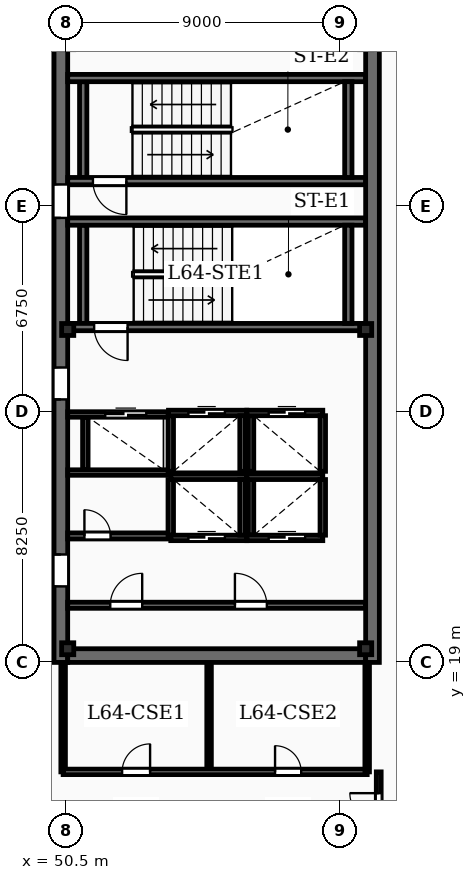
"""IFC4 building model, lengths in metres.
Left out: names, types, materials, properties, quantities, classifications, styles, units other than length and angle.
Written with IfcOpenShell. Run it as: python <this file> out.ifc"""

import sys

from ifc_helpers import new_model, si_unit, direction, frame, frame_2d, origin, origin_2d, place, context, subcontext, project, spatial, rectangle, i_section, extrude, element, fill, save


model = new_model("IFC4")
c1 = context("Model", 3, precision=1e-05, world=origin(), true_north=direction((0.0, 1.0)))
c2 = subcontext(c1, "Body", "Model", "MODEL_VIEW")
j1 = project(units=[si_unit("LENGTHUNIT", "METRE"), si_unit("PLANEANGLEUNIT", "RADIAN")], contexts=[c1])
p1 = place(None, origin())
s1 = spatial("IfcSite", under=j1, at=p1, CompositionType="ELEMENT")
p2 = place(p1, origin())
s2 = spatial("IfcBuilding", under=s1, at=p2, CompositionType="ELEMENT")
p3 = place(p2, frame((0.0, 0.0, 262.2)))
s3 = spatial("IfcBuildingStorey", under=s2, at=p3, CompositionType="ELEMENT", Elevation=262.2)
p4 = place(p3, frame((50.325, 19.0, -0.27), z_axis=(0.0, 0.0, 1.0), x_axis=(0.0, 1.0, 0.0)))
e1 = element("IfcWall", 1, at=p4, inside=s3, PredefinedType="SHEAR", context=c2, shape_type="SweptSolid", body=[
    extrude(rectangle(XDim=20.8, YDim=0.45, at=frame_2d((10.4, 0.0))), origin(), (0.0, 0.0, 1.0), 3.75),
])
p5 = place(p4, frame((2.5, 0.0, 0.27)))
e2 = element("IfcOpeningElement", 2, at=p5, cuts=e1, PredefinedType="OPENING", context=c2, shape_type="SweptSolid", body=[
    extrude(rectangle(XDim=1.05, YDim=2.15, at=frame_2d((0.525, 1.075))), frame((0.0, 0.235, 0.0), z_axis=(0.0, -1.0, 0.0), x_axis=(1.0, 0.0, 0.0)), (0.0, 0.0, 1.0), 0.47),
])
p6 = place(p4, frame((8.65, 0.0, 0.27)))
e3 = element("IfcOpeningElement", 3, at=p6, cuts=e1, PredefinedType="OPENING", context=c2, shape_type="SweptSolid", body=[
    extrude(rectangle(XDim=1.05, YDim=2.15, at=frame_2d((0.525, 1.075))), frame((0.0, 0.235, 0.0), z_axis=(0.0, -1.0, 0.0), x_axis=(1.0, 0.0, 0.0)), (0.0, 0.0, 1.0), 0.47),
])
p7 = place(p4, frame((14.62, 0.0, 0.27)))
e4 = element("IfcOpeningElement", 4, at=p7, cuts=e1, PredefinedType="OPENING", context=c2, shape_type="SweptSolid", body=[
    extrude(rectangle(XDim=1.1, YDim=2.15, at=frame_2d((0.55, 1.075))), frame((0.0, 0.235, 0.0), z_axis=(0.0, -1.0, 0.0), x_axis=(1.0, 0.0, 0.0)), (0.0, 0.0, 1.0), 0.47),
])
p8 = place(p3, frame((60.575, 19.0, -0.27), z_axis=(0.0, 0.0, 1.0), x_axis=(0.0, 1.0, 0.0)))
e5 = element("IfcWall", 5, at=p8, inside=s3, PredefinedType="SHEAR", context=c2, shape_type="SweptSolid", body=[
    extrude(rectangle(XDim=20.8, YDim=0.45, at=frame_2d((10.4, 0.0))), origin(), (0.0, 0.0, 1.0), 3.75),
])
p9 = place(p3, frame((50.55, 19.225, -0.27), z_axis=(0.0, 0.0, 1.0), x_axis=(1.0, 0.0, 0.0)))
e6 = element("IfcWall", 6, at=p9, inside=s3, PredefinedType="SHEAR", context=c2, shape_type="SweptSolid", body=[
    extrude(rectangle(XDim=9.8, YDim=0.45, at=frame_2d((4.9, 0.0))), origin(), (0.0, 0.0, 1.0), 3.75),
])
for number, where, z_axis, x_axis in (
    (7, (50.55, 19.45, -0.27), (0.0, 0.0, 1.0), (1.0, 0.0, 0.0)),
    (8, (60.35, 19.45, -0.27), (0.0, 0.0, 1.0), (1.0, 0.0, 0.0)),
    (9, (50.55, 29.95, -0.27), (0.0, 0.0, 1.0), (1.0, 0.0, 0.0)),
    (10, (60.35, 29.95, -0.27), (0.0, 0.0, 1.0), (1.0, 0.0, 0.0)),
):
    element("IfcColumn", number, at=place(p3, frame(where, z_axis=z_axis, x_axis=x_axis)), inside=s3, PredefinedType="COLUMN", context=c2, shape_type="SweptSolid", body=[
        extrude(i_section(OverallWidth=0.399, OverallDepth=0.393, WebThickness=0.023, FlangeThickness=0.037, FilletRadius=0.02, at=origin_2d()), origin(), (0.0, 0.0, 1.0), 3.75),
    ])
p10 = place(p3, frame((60.35, 30.03, 0.0), z_axis=(0.0, 0.0, 1.0), x_axis=(-1.0, 0.0, 0.0)))
e11 = element("IfcWall", 11, at=p10, inside=s3, PredefinedType="SOLIDWALL", context=c2, shape_type="SweptSolid", body=[
    extrude(rectangle(XDim=9.8, YDim=0.24, at=frame_2d((4.9, 0.0))), origin(), (0.0, 0.0, 1.0), 3.48),
])
p11 = place(p10, frame((7.83, 0.0, 0.0)))
e12 = element("IfcOpeningElement", 12, at=p11, cuts=e11, PredefinedType="OPENING", context=c2, shape_type="SweptSolid", body=[
    extrude(rectangle(XDim=1.1, YDim=2.15, at=frame_2d((0.55, 1.075))), frame((0.0, 0.13, 0.0), z_axis=(0.0, -1.0, 0.0), x_axis=(1.0, 0.0, 0.0)), (0.0, 0.0, 1.0), 0.26),
])
p12 = place(p3, frame((50.55, 33.5, 0.0), z_axis=(0.0, 0.0, 1.0), x_axis=(1.0, 0.0, 0.0)))
e13 = element("IfcWall", 13, at=p12, inside=s3, PredefinedType="SOLIDWALL", context=c2, shape_type="SweptSolid", body=[
    extrude(rectangle(XDim=9.8, YDim=0.24, at=frame_2d((4.9, 0.0))), origin(), (0.0, 0.0, 1.0), 3.48),
])
for number, where, z_axis, x_axis in (
    (14, (51.06, 30.15, 0.0), (0.0, 0.0, 1.0), (0.0, 1.0, 0.0)),
    (15, (59.78, 30.15, 0.0), (0.0, 0.0, 1.0), (0.0, 1.0, 0.0)),
):
    element("IfcWall", number, at=place(p3, frame(where, z_axis=z_axis, x_axis=x_axis)), inside=s3, PredefinedType="SOLIDWALL", context=c2, shape_type="SweptSolid", body=[
        extrude(rectangle(XDim=3.23, YDim=0.24, at=frame_2d((1.615, 0.0))), origin(), (0.0, 0.0, 1.0), 3.48),
    ])
p13 = place(p3, frame((60.35, 34.83, 0.0), z_axis=(0.0, 0.0, 1.0), x_axis=(-1.0, 0.0, 0.0)))
e16 = element("IfcWall", 16, at=p13, inside=s3, PredefinedType="SOLIDWALL", context=c2, shape_type="SweptSolid", body=[
    extrude(rectangle(XDim=9.8, YDim=0.24, at=frame_2d((4.9, 0.0))), origin(), (0.0, 0.0, 1.0), 3.48),
])
p14 = place(p13, frame((7.87, 0.0, 0.0)))
e17 = element("IfcOpeningElement", 17, at=p14, cuts=e16, PredefinedType="OPENING", context=c2, shape_type="SweptSolid", body=[
    extrude(rectangle(XDim=1.1, YDim=2.15, at=frame_2d((0.55, 1.075))), frame((0.0, 0.13, 0.0), z_axis=(0.0, -1.0, 0.0), x_axis=(1.0, 0.0, 0.0)), (0.0, 0.0, 1.0), 0.26),
])
p15 = place(p3, frame((50.55, 38.22, 0.0), z_axis=(0.0, 0.0, 1.0), x_axis=(1.0, 0.0, 0.0)))
e18 = element("IfcWall", 18, at=p15, inside=s3, PredefinedType="SOLIDWALL", context=c2, shape_type="SweptSolid", body=[
    extrude(rectangle(XDim=9.8, YDim=0.24, at=frame_2d((4.9, 0.0))), origin(), (0.0, 0.0, 1.0), 3.48),
])
for number, where, z_axis, x_axis in (
    (19, (51.06, 34.95, 0.0), (0.0, 0.0, 1.0), (0.0, 1.0, 0.0)),
    (20, (59.78, 34.95, 0.0), (0.0, 0.0, 1.0), (0.0, 1.0, 0.0)),
):
    element("IfcWall", number, at=place(p3, frame(where, z_axis=z_axis, x_axis=x_axis)), inside=s3, PredefinedType="SOLIDWALL", context=c2, shape_type="SweptSolid", body=[
        extrude(rectangle(XDim=3.15, YDim=0.24, at=frame_2d((1.575, 0.0))), origin(), (0.0, 0.0, 1.0), 3.48),
    ])
p16 = place(p3, frame((53.94, 25.105, 0.0), z_axis=(0.0, 0.0, 1.0), x_axis=(1.0, 0.0, 0.0)))
e21 = element("IfcWall", 21, at=p16, inside=s3, PredefinedType="SOLIDWALL", context=c2, shape_type="SweptSolid", body=[
    extrude(rectangle(XDim=2.5, YDim=0.18, at=frame_2d((1.25, 0.0))), origin(), (0.0, 0.0, 1.0), 3.48),
])
p17 = place(p3, frame((53.94, 23.095, 0.0), z_axis=(0.0, 0.0, 1.0), x_axis=(1.0, 0.0, 0.0)))
e22 = element("IfcWall", 22, at=p17, inside=s3, PredefinedType="SOLIDWALL", context=c2, shape_type="SweptSolid", body=[
    extrude(rectangle(XDim=2.5, YDim=0.18, at=frame_2d((1.25, 0.0))), origin(), (0.0, 0.0, 1.0), 3.48),
])
p18 = place(p17, frame((0.58, 0.0, 0.0)))
e23 = element("IfcOpeningElement", 23, at=p18, cuts=e22, PredefinedType="OPENING", context=c2, shape_type="SweptSolid", body=[
    extrude(rectangle(XDim=1.2, YDim=2.2, at=frame_2d((0.6, 1.1))), frame((0.0, 0.1, 0.0), z_axis=(0.0, -1.0, 0.0), x_axis=(1.0, 0.0, 0.0)), (0.0, 0.0, 1.0), 0.2),
])
for number, where, z_axis, x_axis in (
    (24, (53.94, 23.185, 0.0), (0.0, 0.0, 1.0), (0.0, 1.0, 0.0)),
    (25, (56.3, 23.185, 0.0), (0.0, 0.0, 1.0), (0.0, 1.0, 0.0)),
):
    element("IfcWall", number, at=place(p3, frame(where, z_axis=z_axis, x_axis=x_axis)), inside=s3, PredefinedType="SOLIDWALL", context=c2, shape_type="SweptSolid", body=[
        extrude(rectangle(XDim=1.83, YDim=0.18, at=frame_2d((0.915, 0.0))), origin(), (0.0, 0.0, 1.0), 3.48),
    ])
p19 = place(p3, frame((56.44, 25.105, 0.0), z_axis=(0.0, 0.0, 1.0), x_axis=(1.0, 0.0, 0.0)))
e26 = element("IfcWall", 26, at=p19, inside=s3, PredefinedType="SOLIDWALL", context=c2, shape_type="SweptSolid", body=[
    extrude(rectangle(XDim=2.5, YDim=0.18, at=frame_2d((1.25, 0.0))), origin(), (0.0, 0.0, 1.0), 3.48),
])
p20 = place(p3, frame((56.44, 23.095, 0.0), z_axis=(0.0, 0.0, 1.0), x_axis=(1.0, 0.0, 0.0)))
e27 = element("IfcWall", 27, at=p20, inside=s3, PredefinedType="SOLIDWALL", context=c2, shape_type="SweptSolid", body=[
    extrude(rectangle(XDim=2.5, YDim=0.18, at=frame_2d((1.25, 0.0))), origin(), (0.0, 0.0, 1.0), 3.48),
])
p21 = place(p20, frame((0.72, 0.0, 0.0)))
e28 = element("IfcOpeningElement", 28, at=p21, cuts=e27, PredefinedType="OPENING", context=c2, shape_type="SweptSolid", body=[
    extrude(rectangle(XDim=1.2, YDim=2.2, at=frame_2d((0.6, 1.1))), frame((0.0, 0.1, 0.0), z_axis=(0.0, -1.0, 0.0), x_axis=(1.0, 0.0, 0.0)), (0.0, 0.0, 1.0), 0.2),
])
for number, where, z_axis, x_axis in (
    (29, (56.58, 23.185, 0.0), (0.0, 0.0, 1.0), (0.0, 1.0, 0.0)),
    (30, (58.94, 23.185, 0.0), (0.0, 0.0, 1.0), (0.0, 1.0, 0.0)),
):
    element("IfcWall", number, at=place(p3, frame(where, z_axis=z_axis, x_axis=x_axis)), inside=s3, PredefinedType="SOLIDWALL", context=c2, shape_type="SweptSolid", body=[
        extrude(rectangle(XDim=1.83, YDim=0.18, at=frame_2d((0.915, 0.0))), origin(), (0.0, 0.0, 1.0), 3.48),
    ])
p22 = place(p3, frame((53.865, 27.205, 0.0), z_axis=(0.0, 0.0, 1.0), x_axis=(1.0, 0.0, 0.0)))
e31 = element("IfcWall", 31, at=p22, inside=s3, PredefinedType="SOLIDWALL", context=c2, shape_type="SweptSolid", body=[
    extrude(rectangle(XDim=2.575, YDim=0.18, at=frame_2d((1.288, 0.0))), origin(), (0.0, 0.0, 1.0), 3.48),
])
p23 = place(p22, frame((0.655, 0.0, 0.0)))
e32 = element("IfcOpeningElement", 32, at=p23, cuts=e31, PredefinedType="OPENING", context=c2, shape_type="SweptSolid", body=[
    extrude(rectangle(XDim=1.2, YDim=2.2, at=frame_2d((0.6, 1.1))), frame((0.0, 0.1, 0.0), z_axis=(0.0, -1.0, 0.0), x_axis=(1.0, 0.0, 0.0)), (0.0, 0.0, 1.0), 0.2),
])
for number, where, z_axis, x_axis in (
    (33, (53.94, 25.285, 0.0), (0.0, 0.0, 1.0), (0.0, 1.0, 0.0)),
    (34, (56.3, 25.285, 0.0), (0.0, 0.0, 1.0), (0.0, 1.0, 0.0)),
):
    element("IfcWall", number, at=place(p3, frame(where, z_axis=z_axis, x_axis=x_axis)), inside=s3, PredefinedType="SOLIDWALL", context=c2, shape_type="SweptSolid", body=[
        extrude(rectangle(XDim=1.83, YDim=0.18, at=frame_2d((0.915, 0.0))), origin(), (0.0, 0.0, 1.0), 3.48),
    ])
p24 = place(p3, frame((56.44, 27.205, 0.0), z_axis=(0.0, 0.0, 1.0), x_axis=(1.0, 0.0, 0.0)))
e35 = element("IfcWall", 35, at=p24, inside=s3, PredefinedType="SOLIDWALL", context=c2, shape_type="SweptSolid", body=[
    extrude(rectangle(XDim=2.5, YDim=0.18, at=frame_2d((1.25, 0.0))), origin(), (0.0, 0.0, 1.0), 3.48),
])
p25 = place(p24, frame((0.72, 0.0, 0.0)))
e36 = element("IfcOpeningElement", 36, at=p25, cuts=e35, PredefinedType="OPENING", context=c2, shape_type="SweptSolid", body=[
    extrude(rectangle(XDim=1.2, YDim=2.2, at=frame_2d((0.6, 1.1))), frame((0.0, 0.1, 0.0), z_axis=(0.0, -1.0, 0.0), x_axis=(1.0, 0.0, 0.0)), (0.0, 0.0, 1.0), 0.2),
])
for number, where, z_axis, x_axis in (
    (37, (56.58, 25.285, 0.0), (0.0, 0.0, 1.0), (0.0, 1.0, 0.0)),
    (38, (58.94, 25.285, 0.0), (0.0, 0.0, 1.0), (0.0, 1.0, 0.0)),
):
    element("IfcWall", number, at=place(p3, frame(where, z_axis=z_axis, x_axis=x_axis)), inside=s3, PredefinedType="SOLIDWALL", context=c2, shape_type="SweptSolid", body=[
        extrude(rectangle(XDim=1.83, YDim=0.18, at=frame_2d((0.915, 0.0))), origin(), (0.0, 0.0, 1.0), 3.48),
    ])
p26 = place(p3, frame((50.55, 27.155, 0.0), z_axis=(0.0, 0.0, 1.0), x_axis=(1.0, 0.0, 0.0)))
e39 = element("IfcWall", 39, at=p26, inside=s3, PredefinedType="SOLIDWALL", context=c2, shape_type="SweptSolid", body=[
    extrude(rectangle(XDim=3.315, YDim=0.18, at=frame_2d((1.657, 0.0))), origin(), (0.0, 0.0, 1.0), 3.48),
])
p27 = place(p26, frame((1.235, 0.0, 0.0)))
e40 = element("IfcOpeningElement", 40, at=p27, cuts=e39, PredefinedType="OPENING", context=c2, shape_type="SweptSolid", body=[
    extrude(rectangle(XDim=1.35, YDim=2.3, at=frame_2d((0.675, 1.15))), frame((0.0, 0.1, 0.0), z_axis=(0.0, -1.0, 0.0), x_axis=(1.0, 0.0, 0.0)), (0.0, 0.0, 1.0), 0.2),
])
p28 = place(p3, frame((50.55, 25.245, 0.0), z_axis=(0.0, 0.0, 1.0), x_axis=(1.0, 0.0, 0.0)))
e41 = element("IfcWall", 41, at=p28, inside=s3, PredefinedType="SOLIDWALL", context=c2, shape_type="SweptSolid", body=[
    extrude(rectangle(XDim=3.315, YDim=0.18, at=frame_2d((1.657, 0.0))), origin(), (0.0, 0.0, 1.0), 3.48),
])
p29 = place(p3, frame((51.13, 25.335, 0.0), z_axis=(0.0, 0.0, 1.0), x_axis=(0.0, 1.0, 0.0)))
e42 = element("IfcWall", 42, at=p29, inside=s3, PredefinedType="SOLIDWALL", context=c2, shape_type="SweptSolid", body=[
    extrude(rectangle(XDim=1.73, YDim=0.18, at=frame_2d((0.865, 0.0))), origin(), (0.0, 0.0, 1.0), 3.48),
])
p30 = place(p3, frame((50.55, 20.88, 0.0), z_axis=(0.0, 0.0, 1.0), x_axis=(1.0, 0.0, 0.0)))
e43 = element("IfcWall", 43, at=p30, inside=s3, PredefinedType="SOLIDWALL", context=c2, shape_type="SweptSolid", body=[
    extrude(rectangle(XDim=9.8, YDim=0.2, at=frame_2d((4.9, 0.0))), origin(), (0.0, 0.0, 1.0), 2.54),
])
p31 = place(p30, frame((1.4, 0.0, 0.0)))
e44 = element("IfcOpeningElement", 44, at=p31, cuts=e43, PredefinedType="OPENING", context=c2, shape_type="SweptSolid", body=[
    extrude(rectangle(XDim=1.05, YDim=2.15, at=frame_2d((0.525, 1.075))), frame((0.0, 0.11, 0.0), z_axis=(0.0, -1.0, 0.0), x_axis=(1.0, 0.0, 0.0)), (0.0, 0.0, 1.0), 0.22),
])
p32 = place(p30, frame((5.5, 0.0, 0.0)))
e45 = element("IfcOpeningElement", 45, at=p32, cuts=e43, PredefinedType="OPENING", context=c2, shape_type="SweptSolid", body=[
    extrude(rectangle(XDim=1.05, YDim=2.15, at=frame_2d((0.525, 1.075))), frame((0.0, 0.11, 0.0), z_axis=(0.0, -1.0, 0.0), x_axis=(1.0, 0.0, 0.0)), (0.0, 0.0, 1.0), 0.22),
])
p33 = place(p3, frame((50.55, 23.16, 0.0), z_axis=(0.0, 0.0, 1.0), x_axis=(1.0, 0.0, 0.0)))
e46 = element("IfcWall", 46, at=p33, inside=s3, PredefinedType="SOLIDWALL", context=c2, shape_type="SweptSolid", body=[
    extrude(rectangle(XDim=3.33, YDim=0.2, at=frame_2d((1.665, 0.0))), origin(), (0.0, 0.0, 1.0), 2.54),
])
p34 = place(p33, frame((0.55, 0.0, 0.0)))
e47 = element("IfcOpeningElement", 47, at=p34, cuts=e46, PredefinedType="OPENING", context=c2, shape_type="SweptSolid", body=[
    extrude(rectangle(XDim=0.86, YDim=2.05, at=frame_2d((0.43, 1.025))), frame((0.0, 0.11, 0.0), z_axis=(0.0, -1.0, 0.0), x_axis=(1.0, 0.0, 0.0)), (0.0, 0.0, 1.0), 0.22),
])
p35 = place(p3, frame((55.2, 15.4, 0.0), z_axis=(0.0, 0.0, 1.0), x_axis=(0.0, 1.0, 0.0)))
e48 = element("IfcWall", 48, at=p35, inside=s3, PredefinedType="PARTITIONING", context=c2, shape_type="SweptSolid", body=[
    extrude(rectangle(XDim=3.58, YDim=0.15, at=frame_2d((1.79, 0.0))), origin(), (0.0, 0.0, 1.0), 2.54),
])
p36 = place(p3, frame((50.4, 15.4, 0.0), z_axis=(0.0, 0.0, 1.0), x_axis=(1.0, 0.0, 0.0)))
e49 = element("IfcWall", 49, at=p36, inside=s3, PredefinedType="SOLIDWALL", context=c2, shape_type="SweptSolid", body=[
    extrude(rectangle(XDim=10.0, YDim=0.18, at=frame_2d((5.0, 0.0))), origin(), (0.0, 0.0, 1.0), 2.54),
])
p37 = place(p36, frame((1.94, 0.0, 0.0)))
e50 = element("IfcOpeningElement", 50, at=p37, cuts=e49, PredefinedType="OPENING", context=c2, shape_type="SweptSolid", body=[
    extrude(rectangle(XDim=0.92, YDim=2.1, at=frame_2d((0.46, 1.05))), frame((0.0, 0.1, 0.0), z_axis=(0.0, -1.0, 0.0), x_axis=(1.0, 0.0, 0.0)), (0.0, 0.0, 1.0), 0.2),
])
p38 = place(p36, frame((6.97, 0.0, 0.0)))
e51 = element("IfcOpeningElement", 51, at=p38, cuts=e49, PredefinedType="OPENING", context=c2, shape_type="SweptSolid", body=[
    extrude(rectangle(XDim=0.86, YDim=2.05, at=frame_2d((0.43, 1.025))), frame((0.0, 0.1, 0.0), z_axis=(0.0, -1.0, 0.0), x_axis=(1.0, 0.0, 0.0)), (0.0, 0.0, 1.0), 0.2),
])
for number, where, z_axis, x_axis in (
    (52, (50.4, 15.4, 0.0), (0.0, 0.0, 1.0), (0.0, 1.0, 0.0)),
    (53, (60.4, 15.4, 0.0), (0.0, 0.0, 1.0), (0.0, 1.0, 0.0)),
):
    element("IfcWall", number, at=place(p3, frame(where, z_axis=z_axis, x_axis=x_axis)), inside=s3, PredefinedType="PARTITIONING", context=c2, shape_type="SweptSolid", body=[
        extrude(rectangle(XDim=3.58, YDim=0.15, at=frame_2d((1.79, 0.0))), origin(), (0.0, 0.0, 1.0), 2.54),
    ])
p39 = place(p3, frame((47.82, 36.2, 0.0), z_axis=(0.0, 0.0, 1.0), x_axis=(1.0, 0.0, 0.0)))
e54 = element("IfcWall", 54, at=p39, inside=s3, PredefinedType="PARTITIONING", context=c2, shape_type="SweptSolid", body=[
    extrude(rectangle(XDim=2.26, YDim=0.16, at=frame_2d((1.13, 0.0))), origin(), (0.0, 0.0, 1.0), 2.54),
])
p40 = place(p3, frame((60.78, 13.1, 0.0), z_axis=(0.0, 0.0, 1.0), x_axis=(0.0, 1.0, 0.0)))
e55 = element("IfcWall", 55, at=p40, inside=s3, PredefinedType="PARTITIONING", context=c2, shape_type="SweptSolid", body=[
    extrude(rectangle(XDim=2.3, YDim=0.16, at=frame_2d((1.15, 0.0))), origin(), (0.0, 0.0, 1.0), 2.54),
])
p41 = place(p40, frame((0.65, 0.0, 0.0)))
e56 = element("IfcOpeningElement", 56, at=p41, cuts=e55, PredefinedType="OPENING", context=c2, shape_type="SweptSolid", body=[
    extrude(rectangle(XDim=0.95, YDim=2.15, at=frame_2d((0.475, 1.075))), frame((0.0, 0.09, 0.0), z_axis=(0.0, -1.0, 0.0), x_axis=(1.0, 0.0, 0.0)), (0.0, 0.0, 1.0), 0.18),
])
p42 = place(p5, origin())
e57 = element("IfcDoor", 57, at=p42, inside=s3, OperationType="SINGLE_SWING_RIGHT", PredefinedType="DOOR", context=c2, shape_type="SweptSolid", body=[
    extrude(rectangle(XDim=1.05, YDim=2.15, at=frame_2d((0.525, 1.075))), frame((0.0, 0.025, 0.0), z_axis=(0.0, -1.0, 0.0), x_axis=(1.0, 0.0, 0.0)), (0.0, 0.0, 1.0), 0.05),
])
fill(e2, e57)
p43 = place(p6, origin())
e58 = element("IfcDoor", 58, at=p43, inside=s3, OperationType="SINGLE_SWING_LEFT", PredefinedType="DOOR", context=c2, shape_type="SweptSolid", body=[
    extrude(rectangle(XDim=1.05, YDim=2.15, at=frame_2d((0.525, 1.075))), frame((0.0, 0.025, 0.0), z_axis=(0.0, -1.0, 0.0), x_axis=(1.0, 0.0, 0.0)), (0.0, 0.0, 1.0), 0.05),
])
fill(e3, e58)
p44 = place(p7, origin())
e59 = element("IfcDoor", 59, at=p44, inside=s3, OperationType="SINGLE_SWING_LEFT", PredefinedType="DOOR", context=c2, shape_type="SweptSolid", body=[
    extrude(rectangle(XDim=1.1, YDim=2.15, at=frame_2d((0.55, 1.075))), frame((0.0, 0.025, 0.0), z_axis=(0.0, -1.0, 0.0), x_axis=(1.0, 0.0, 0.0)), (0.0, 0.0, 1.0), 0.05),
])
fill(e4, e59)
p45 = place(p11, origin())
e60 = element("IfcDoor", 60, at=p45, inside=s3, OperationType="SINGLE_SWING_LEFT", PredefinedType="DOOR", context=c2, shape_type="SweptSolid", body=[
    extrude(rectangle(XDim=1.1, YDim=2.15, at=frame_2d((0.55, 1.075))), frame((0.0, 0.025, 0.0), z_axis=(0.0, -1.0, 0.0), x_axis=(1.0, 0.0, 0.0)), (0.0, 0.0, 1.0), 0.05),
])
fill(e12, e60)
p46 = place(p14, origin())
e61 = element("IfcDoor", 61, at=p46, inside=s3, OperationType="SINGLE_SWING_LEFT", PredefinedType="DOOR", context=c2, shape_type="SweptSolid", body=[
    extrude(rectangle(XDim=1.1, YDim=2.15, at=frame_2d((0.55, 1.075))), frame((0.0, 0.025, 0.0), z_axis=(0.0, -1.0, 0.0), x_axis=(1.0, 0.0, 0.0)), (0.0, 0.0, 1.0), 0.05),
])
fill(e17, e61)
p47 = place(p18, origin())
e62 = element("IfcDoor", 62, at=p47, inside=s3, OperationType="DOUBLE_DOOR_SLIDING", PredefinedType="DOOR", context=c2, shape_type="SweptSolid", body=[
    extrude(rectangle(XDim=1.2, YDim=2.2, at=frame_2d((0.6, 1.1))), frame((0.0, 0.025, 0.0), z_axis=(0.0, -1.0, 0.0), x_axis=(1.0, 0.0, 0.0)), (0.0, 0.0, 1.0), 0.05),
])
fill(e23, e62)
p48 = place(p21, origin())
e63 = element("IfcDoor", 63, at=p48, inside=s3, OperationType="DOUBLE_DOOR_SLIDING", PredefinedType="DOOR", context=c2, shape_type="SweptSolid", body=[
    extrude(rectangle(XDim=1.2, YDim=2.2, at=frame_2d((0.6, 1.1))), frame((0.0, 0.025, 0.0), z_axis=(0.0, -1.0, 0.0), x_axis=(1.0, 0.0, 0.0)), (0.0, 0.0, 1.0), 0.05),
])
fill(e28, e63)
p49 = place(p23, origin())
e64 = element("IfcDoor", 64, at=p49, inside=s3, OperationType="DOUBLE_DOOR_SLIDING", PredefinedType="DOOR", context=c2, shape_type="SweptSolid", body=[
    extrude(rectangle(XDim=1.2, YDim=2.2, at=frame_2d((0.6, 1.1))), frame((0.0, 0.025, 0.0), z_axis=(0.0, -1.0, 0.0), x_axis=(1.0, 0.0, 0.0)), (0.0, 0.0, 1.0), 0.05),
])
fill(e32, e64)
p50 = place(p25, origin())
e65 = element("IfcDoor", 65, at=p50, inside=s3, OperationType="DOUBLE_DOOR_SLIDING", PredefinedType="DOOR", context=c2, shape_type="SweptSolid", body=[
    extrude(rectangle(XDim=1.2, YDim=2.2, at=frame_2d((0.6, 1.1))), frame((0.0, 0.025, 0.0), z_axis=(0.0, -1.0, 0.0), x_axis=(1.0, 0.0, 0.0)), (0.0, 0.0, 1.0), 0.05),
])
fill(e36, e65)
p51 = place(p27, origin())
e66 = element("IfcDoor", 66, at=p51, inside=s3, OperationType="DOUBLE_DOOR_SLIDING", PredefinedType="DOOR", context=c2, shape_type="SweptSolid", body=[
    extrude(rectangle(XDim=1.35, YDim=2.3, at=frame_2d((0.675, 1.15))), frame((0.0, 0.025, 0.0), z_axis=(0.0, -1.0, 0.0), x_axis=(1.0, 0.0, 0.0)), (0.0, 0.0, 1.0), 0.05),
])
fill(e40, e66)
p52 = place(p31, origin())
e67 = element("IfcDoor", 67, at=p52, inside=s3, OperationType="SINGLE_SWING_RIGHT", PredefinedType="DOOR", context=c2, shape_type="SweptSolid", body=[
    extrude(rectangle(XDim=1.05, YDim=2.15, at=frame_2d((0.525, 1.075))), frame((0.0, 0.025, 0.0), z_axis=(0.0, -1.0, 0.0), x_axis=(1.0, 0.0, 0.0)), (0.0, 0.0, 1.0), 0.05),
])
fill(e44, e67)
p53 = place(p32, origin())
e68 = element("IfcDoor", 68, at=p53, inside=s3, OperationType="SINGLE_SWING_LEFT", PredefinedType="DOOR", context=c2, shape_type="SweptSolid", body=[
    extrude(rectangle(XDim=1.05, YDim=2.15, at=frame_2d((0.525, 1.075))), frame((0.0, 0.025, 0.0), z_axis=(0.0, -1.0, 0.0), x_axis=(1.0, 0.0, 0.0)), (0.0, 0.0, 1.0), 0.05),
])
fill(e45, e68)
p54 = place(p34, origin())
e69 = element("IfcDoor", 69, at=p54, inside=s3, OperationType="SINGLE_SWING_LEFT", PredefinedType="DOOR", context=c2, shape_type="SweptSolid", body=[
    extrude(rectangle(XDim=0.86, YDim=2.05, at=frame_2d((0.43, 1.025))), frame((0.0, 0.025, 0.0), z_axis=(0.0, -1.0, 0.0), x_axis=(1.0, 0.0, 0.0)), (0.0, 0.0, 1.0), 0.05),
])
fill(e47, e69)
p55 = place(p37, origin())
e70 = element("IfcDoor", 70, at=p55, inside=s3, OperationType="SINGLE_SWING_RIGHT", PredefinedType="DOOR", context=c2, shape_type="SweptSolid", body=[
    extrude(rectangle(XDim=0.92, YDim=2.1, at=frame_2d((0.46, 1.05))), frame((0.0, 0.025, 0.0), z_axis=(0.0, -1.0, 0.0), x_axis=(1.0, 0.0, 0.0)), (0.0, 0.0, 1.0), 0.05),
])
fill(e50, e70)
p56 = place(p38, origin())
e71 = element("IfcDoor", 71, at=p56, inside=s3, OperationType="SINGLE_SWING_LEFT", PredefinedType="DOOR", context=c2, shape_type="SweptSolid", body=[
    extrude(rectangle(XDim=0.86, YDim=2.05, at=frame_2d((0.43, 1.025))), frame((0.0, 0.025, 0.0), z_axis=(0.0, -1.0, 0.0), x_axis=(1.0, 0.0, 0.0)), (0.0, 0.0, 1.0), 0.05),
])
fill(e51, e71)
p57 = place(p41, origin())
e72 = element("IfcDoor", 72, at=p57, inside=s3, OperationType="SINGLE_SWING_RIGHT", PredefinedType="DOOR", context=c2, shape_type="SweptSolid", body=[
    extrude(rectangle(XDim=0.95, YDim=2.15, at=frame_2d((0.475, 1.075))), frame((0.0, 0.025, 0.0), z_axis=(0.0, -1.0, 0.0), x_axis=(1.0, 0.0, 0.0)), (0.0, 0.0, 1.0), 0.05),
])
fill(e56, e72)
save(model, sys.argv[1])
